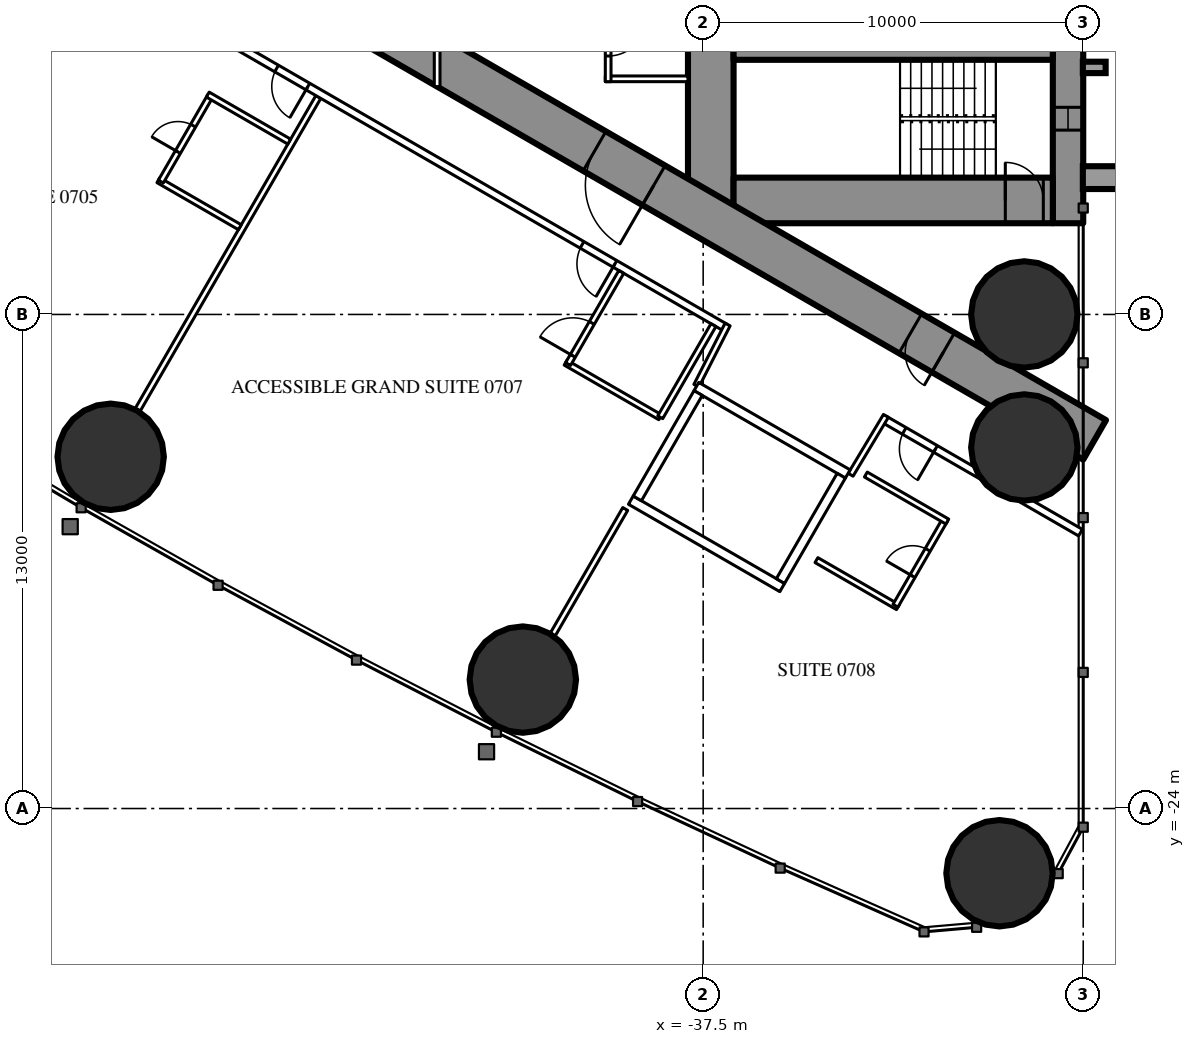
"""IFC4 building model, lengths in metres.
Left out: names, types, materials, properties, quantities, classifications, styles, units other than length and angle.
Written with IfcOpenShell. Run it as: python <this file> out.ifc"""

import sys

from ifc_helpers import new_model, si_unit, direction, frame, frame_2d, origin, origin_2d, place, context, subcontext, project, spatial, rectangle, hollow_circle, extrude, element, fill, save


model = new_model("IFC4")
c1 = context("Model", 3, precision=1e-05, world=origin(), true_north=direction((0.0, 1.0)))
c2 = subcontext(c1, "Body", "Model", "MODEL_VIEW")
j1 = project(units=[si_unit("LENGTHUNIT", "METRE"), si_unit("PLANEANGLEUNIT", "RADIAN")], contexts=[c1])
p1 = place(None, origin())
s1 = spatial("IfcSite", under=j1, at=p1, CompositionType="ELEMENT")
p2 = place(p1, origin())
s2 = spatial("IfcBuilding", under=s1, at=p2, CompositionType="ELEMENT")
p3 = place(p2, frame((0.0, 0.0, 32.0)))
s3 = spatial("IfcBuildingStorey", under=s2, at=p3, CompositionType="ELEMENT", Elevation=32.0)
for number, where, z_axis, x_axis in (
    (1, (-29.703, -25.703, 0.0), (0.0, 0.0, 1.0), (1.0, 0.0, 0.0)),
    (2, (-29.05, -11.0, 0.0), (0.0, 0.0, 1.0), (1.0, 0.0, 0.0)),
    (3, (-29.05, -14.5, 0.0), (0.0, 0.0, 1.0), (1.0, 0.0, 0.0)),
    (4, (-53.09, -14.745, 0.0), (0.0, 0.0, 1.0), (1.0, 0.0, 0.0)),
    (5, (-42.245, -20.607, 0.0), (0.0, 0.0, 1.0), (1.0, 0.0, 0.0)),
):
    element("IfcColumn", number, at=place(p3, frame(where, z_axis=z_axis, x_axis=x_axis)), inside=s3, PredefinedType="COLUMN", context=c2, shape_type="SweptSolid", body=[
        extrude(hollow_circle(Radius=1.4, WallThickness=0.12, at=origin_2d()), origin(), (0.0, 0.0, 1.0), 3.5),
    ])
p4 = place(p3, frame((-27.9, 8.6, 0.0), z_axis=(0.0, 0.0, 1.0), x_axis=(0.0, -1.0, 0.0)))
e6 = element("IfcWall", 6, at=p4, inside=s3, PredefinedType="SHEAR", context=c2, shape_type="SweptSolid", body=[
    extrude(rectangle(XDim=17.2, YDim=0.8, at=frame_2d((8.6, 0.0))), origin(), (0.0, 0.0, 1.0), 3.5),
])
p5 = place(p4, frame((2.45, 0.0, 0.6)))
e7 = element("IfcOpeningElement", 7, at=p5, cuts=e6, PredefinedType="OPENING", context=c2, shape_type="SweptSolid", body=[
    extrude(rectangle(XDim=0.6, YDim=2.1, at=frame_2d((0.3, 1.05))), frame((0.0, 0.41, 0.0), z_axis=(0.0, -1.0, 0.0), x_axis=(1.0, 0.0, 0.0)), (0.0, 0.0, 1.0), 0.82),
])
p6 = place(p4, frame((14.15, 0.0, 0.6)))
e8 = element("IfcOpeningElement", 8, at=p6, cuts=e6, PredefinedType="OPENING", context=c2, shape_type="SweptSolid", body=[
    extrude(rectangle(XDim=0.6, YDim=2.1, at=frame_2d((0.3, 1.05))), frame((0.0, 0.41, 0.0), z_axis=(0.0, -1.0, 0.0), x_axis=(1.0, 0.0, 0.0)), (0.0, 0.0, 1.0), 0.82),
])
p7 = place(p3, frame((-37.3, 8.6, 0.0), z_axis=(0.0, 0.0, 1.0), x_axis=(0.0, -1.0, 0.0)))
e9 = element("IfcWall", 9, at=p7, inside=s3, PredefinedType="SHEAR", context=c2, shape_type="SweptSolid", body=[
    extrude(rectangle(XDim=17.2, YDim=1.2, at=frame_2d((8.6, 0.0))), origin(), (0.0, 0.0, 1.0), 3.5),
])
p8 = place(p7, frame((7.7, 0.0, 0.0)))
e10 = element("IfcOpeningElement", 10, at=p8, cuts=e9, PredefinedType="OPENING", context=c2, shape_type="SweptSolid", body=[
    extrude(rectangle(XDim=1.8, YDim=2.2, at=frame_2d((0.9, 1.1))), frame((0.0, 0.61, 0.0), z_axis=(0.0, -1.0, 0.0), x_axis=(1.0, 0.0, 0.0)), (0.0, 0.0, 1.0), 1.22),
])
p9 = place(p3, frame((-28.3, -8.0, 0.0), z_axis=(0.0, 0.0, 1.0), x_axis=(-1.0, 0.0, 0.0)))
e11 = element("IfcWall", 11, at=p9, inside=s3, PredefinedType="SHEAR", context=c2, shape_type="SweptSolid", body=[
    extrude(rectangle(XDim=8.4, YDim=1.2, at=frame_2d((4.2, 0.0))), origin(), (0.0, 0.0, 1.0), 3.5),
])
p10 = place(p9, frame((0.25, 0.0, 0.0)))
e12 = element("IfcOpeningElement", 12, at=p10, cuts=e11, PredefinedType="OPENING", context=c2, shape_type="SweptSolid", body=[
    extrude(rectangle(XDim=1.0, YDim=2.2, at=frame_2d((0.5, 1.1))), frame((0.0, 0.61, 0.0), z_axis=(0.0, -1.0, 0.0), x_axis=(1.0, 0.0, 0.0)), (0.0, 0.0, 1.0), 1.22),
])
p11 = place(p3, frame((-28.3, -4.15, 0.0), z_axis=(0.0, 0.0, 1.0), x_axis=(-1.0, 0.0, 0.0)))
e13 = element("IfcWall", 13, at=p11, inside=s3, PredefinedType="SHEAR", context=c2, shape_type="SweptSolid", body=[
    extrude(rectangle(XDim=8.4, YDim=0.3, at=frame_2d((4.2, 0.0))), origin(), (0.0, 0.0, 1.0), 3.5),
])
p12 = place(p3, frame((-27.2, -14.3, 0.0), z_axis=(0.0, 0.0, 1.0), x_axis=(-0.866024021859, 0.500002393557, 0.0)))
e14 = element("IfcWall", 14, at=p12, inside=s3, PredefinedType="SHEAR", context=c2, shape_type="SweptSolid", body=[
    extrude(rectangle(XDim=27.907, YDim=1.2, at=frame_2d((13.954, 0.0))), origin(), (0.0, 0.0, 1.0), 3.5),
])
p13 = place(p12, frame((4.6, 0.0, 0.0)))
e15 = element("IfcOpeningElement", 15, at=p13, cuts=e14, PredefinedType="OPENING", context=c2, shape_type="SweptSolid", body=[
    extrude(rectangle(XDim=1.0, YDim=2.2, at=frame_2d((0.5, 1.1))), frame((0.0, 0.61, 0.0), z_axis=(0.0, -1.0, 0.0), x_axis=(1.0, 0.0, 0.0)), (0.0, 0.0, 1.0), 1.22),
])
p14 = place(p12, frame((13.395, 0.0, 0.0)))
e16 = element("IfcOpeningElement", 16, at=p14, cuts=e14, PredefinedType="OPENING", context=c2, shape_type="SweptSolid", body=[
    extrude(rectangle(XDim=1.8, YDim=2.2, at=frame_2d((0.9, 1.1))), frame((0.0, 0.61, 0.0), z_axis=(0.0, -1.0, 0.0), x_axis=(1.0, 0.0, 0.0)), (0.0, 0.0, 1.0), 1.22),
])
p15 = place(p3, frame((-47.627, -5.278, 0.0), z_axis=(0.0, 0.0, 1.0), x_axis=(-0.500009844318, -0.86601972009, 0.0)))
e17 = element("IfcWall", 17, at=p15, inside=s3, PredefinedType="PARTITIONING", context=c2, shape_type="SweptSolid", body=[
    extrude(rectangle(XDim=9.51, YDim=0.15, at=frame_2d((4.755, 0.0))), origin(), (0.0, 0.0, 1.0), 2.25),
])
p16 = place(p3, frame((-39.551, -16.118, 0.0), z_axis=(0.0, 0.0, 1.0), x_axis=(-0.499986503906, -0.866033195618, 0.0)))
e18 = element("IfcWall", 18, at=p16, inside=s3, PredefinedType="PARTITIONING", context=c2, shape_type="SweptSolid", body=[
    extrude(rectangle(XDim=3.815, YDim=0.15, at=frame_2d((1.907, 0.0))), origin(), (0.0, 0.0, 1.0), 3.25),
])
p17 = place(p3, frame((-27.572, -16.741, 0.0), z_axis=(0.0, 0.0, 1.0), x_axis=(-0.866024464444, 0.500001626982, 0.0)))
e19 = element("IfcWall", 19, at=p17, inside=s3, PredefinedType="PARTITIONING", context=c2, shape_type="SweptSolid", body=[
    extrude(rectangle(XDim=5.955, YDim=0.2, at=frame_2d((2.978, 0.0))), origin(), (0.0, 0.0, 1.0), 3.25),
])
p18 = place(p17, frame((4.405, 0.0, 0.0)))
e20 = element("IfcOpeningElement", 20, at=p18, cuts=e19, PredefinedType="OPENING", context=c2, shape_type="SweptSolid", body=[
    extrude(rectangle(XDim=0.95, YDim=2.2, at=frame_2d((0.475, 1.1))), frame((0.0, 0.11, 0.0), z_axis=(0.0, -1.0, 0.0), x_axis=(1.0, 0.0, 0.0)), (0.0, 0.0, 1.0), 0.22),
])
p19 = place(p3, frame((-36.92, -11.344, 0.0), z_axis=(0.0, 0.0, 1.0), x_axis=(-0.866028313256, 0.499994960614, 0.0)))
e21 = element("IfcWall", 21, at=p19, inside=s3, PredefinedType="PARTITIONING", context=c2, shape_type="SweptSolid", body=[
    extrude(rectangle(XDim=22.568, YDim=0.2, at=frame_2d((11.284, 0.0))), origin(), (0.0, 0.0, 1.0), 3.25),
])
p20 = place(p19, frame((12.68, 0.0, 0.0)))
e22 = element("IfcOpeningElement", 22, at=p20, cuts=e21, PredefinedType="OPENING", context=c2, shape_type="SweptSolid", body=[
    extrude(rectangle(XDim=0.95, YDim=2.2, at=frame_2d((0.475, 1.1))), frame((0.0, 0.11, 0.0), z_axis=(0.0, -1.0, 0.0), x_axis=(1.0, 0.0, 0.0)), (0.0, 0.0, 1.0), 0.22),
])
p21 = place(p19, frame((3.35, 0.0, 0.0)))
e23 = element("IfcOpeningElement", 23, at=p21, cuts=e21, PredefinedType="OPENING", context=c2, shape_type="SweptSolid", body=[
    extrude(rectangle(XDim=1.0, YDim=2.2, at=frame_2d((0.5, 1.1))), frame((0.0, 0.11, 0.0), z_axis=(0.0, -1.0, 0.0), x_axis=(1.0, 0.0, 0.0)), (0.0, 0.0, 1.0), 0.22),
])
p22 = place(p3, frame((-36.857, -11.265, 0.0), z_axis=(0.0, 0.0, 1.0), x_axis=(-0.454225294761, -0.890886851176, 0.0)))
e24 = element("IfcWall", 24, at=p22, inside=s3, PredefinedType="PARTITIONING", context=c2, shape_type="SweptSolid", body=[
    extrude(rectangle(XDim=1.807, YDim=0.15, at=frame_2d((0.904, 0.0))), origin(), (0.0, 0.0, 1.0), 3.25),
])
p23 = place(p3, frame((-33.621, -15.218, 0.0), z_axis=(0.0, 0.0, 1.0), x_axis=(0.514336634837, 0.857588377991, 0.0)))
e25 = element("IfcWall", 25, at=p23, inside=s3, PredefinedType="PARTITIONING", context=c2, shape_type="SweptSolid", body=[
    extrude(rectangle(XDim=1.805, YDim=0.15, at=frame_2d((0.903, 0.0))), origin(), (0.0, 0.0, 1.0), 3.25),
])
p24 = place(p3, frame((-49.692, -8.704, 0.0), z_axis=(0.0, 0.0, 1.0), x_axis=(-0.866073894602, 0.499916002032, 0.0)))
e26 = element("IfcWall", 26, at=p24, inside=s3, PredefinedType="PARTITIONING", context=c2, shape_type="SweptSolid", body=[
    extrude(rectangle(XDim=2.475, YDim=0.15, at=frame_2d((1.238, 0.0))), origin(), (0.0, 0.0, 1.0), 3.25),
])
p25 = place(p3, frame((-50.47, -5.253, 0.0), z_axis=(0.0, 0.0, 1.0), x_axis=(-0.500006934395, -0.866021400173, 0.0)))
e27 = element("IfcWall", 27, at=p25, inside=s3, PredefinedType="PARTITIONING", context=c2, shape_type="SweptSolid", body=[
    extrude(rectangle(XDim=2.6, YDim=0.15, at=frame_2d((1.3, 0.0))), origin(), (0.0, 0.0, 1.0), 3.25),
])
p26 = place(p25, frame((0.9, 0.0, 0.0)))
e28 = element("IfcOpeningElement", 28, at=p26, cuts=e27, PredefinedType="OPENING", context=c2, shape_type="SweptSolid", body=[
    extrude(rectangle(XDim=0.8, YDim=2.2, at=frame_2d((0.4, 1.1))), frame((0.0, 0.085, 0.0), z_axis=(0.0, -1.0, 0.0), x_axis=(1.0, 0.0, 0.0)), (0.0, 0.0, 1.0), 0.17),
])
p27 = place(p3, frame((-48.392, -6.453, 0.0), z_axis=(0.0, 0.0, 1.0), x_axis=(-0.86604923931, 0.499958713387, 0.0)))
e29 = element("IfcWall", 29, at=p27, inside=s3, PredefinedType="PARTITIONING", context=c2, shape_type="SweptSolid", body=[
    extrude(rectangle(XDim=2.475, YDim=0.15, at=frame_2d((1.237, 0.0))), origin(), (0.0, 0.0, 1.0), 3.25),
])
p28 = place(p3, frame((-38.63, -13.705, 0.0), z_axis=(0.0, 0.0, 1.0), x_axis=(-0.866018712932, 0.500011588718, 0.0)))
e30 = element("IfcWall", 30, at=p28, inside=s3, PredefinedType="PARTITIONING", context=c2, shape_type="SweptSolid", body=[
    extrude(rectangle(XDim=2.875, YDim=0.15, at=frame_2d((1.438, 0.0))), origin(), (0.0, 0.0, 1.0), 3.25),
])
p29 = place(p3, frame((-39.655, -9.88, 0.0), z_axis=(0.0, 0.0, 1.0), x_axis=(-0.500049511043, -0.865996816683, 0.0)))
e31 = element("IfcWall", 31, at=p29, inside=s3, PredefinedType="PARTITIONING", context=c2, shape_type="SweptSolid", body=[
    extrude(rectangle(XDim=2.8, YDim=0.15, at=frame_2d((1.4, 0.0))), origin(), (0.0, 0.0, 1.0), 3.25),
])
p30 = place(p29, frame((1.55, 0.0, 0.0)))
e32 = element("IfcOpeningElement", 32, at=p30, cuts=e31, PredefinedType="OPENING", context=c2, shape_type="SweptSolid", body=[
    extrude(rectangle(XDim=1.0, YDim=2.2, at=frame_2d((0.5, 1.1))), frame((0.0, 0.085, 0.0), z_axis=(0.0, -1.0, 0.0), x_axis=(1.0, 0.0, 0.0)), (0.0, 0.0, 1.0), 0.17),
])
p31 = place(p3, frame((-37.23, -11.281, 0.0), z_axis=(0.0, 0.0, 1.0), x_axis=(-0.500049511043, -0.865996816683, 0.0)))
e33 = element("IfcWall", 33, at=p31, inside=s3, PredefinedType="PARTITIONING", context=c2, shape_type="SweptSolid", body=[
    extrude(rectangle(XDim=2.8, YDim=0.15, at=frame_2d((1.4, 0.0))), origin(), (0.0, 0.0, 1.0), 3.25),
])
p32 = place(p3, frame((-32.376, -18.702, 0.0), z_axis=(0.0, 0.0, 1.0), x_axis=(-0.866006523861, 0.500032699561, 0.0)))
e34 = element("IfcWall", 34, at=p32, inside=s3, PredefinedType="PARTITIONING", context=c2, shape_type="SweptSolid", body=[
    extrude(rectangle(XDim=2.475, YDim=0.15, at=frame_2d((1.237, 0.0))), origin(), (0.0, 0.0, 1.0), 3.25),
])
p33 = place(p3, frame((-31.141, -16.413, 0.0), z_axis=(0.0, 0.0, 1.0), x_axis=(-0.500006934395, -0.866021400173, 0.0)))
e35 = element("IfcWall", 35, at=p33, inside=s3, PredefinedType="PARTITIONING", context=c2, shape_type="SweptSolid", body=[
    extrude(rectangle(XDim=2.6, YDim=0.15, at=frame_2d((1.3, 0.0))), origin(), (0.0, 0.0, 1.0), 3.25),
])
p34 = place(p33, frame((0.9, 0.0, 0.0)))
e36 = element("IfcOpeningElement", 36, at=p34, cuts=e35, PredefinedType="OPENING", context=c2, shape_type="SweptSolid", body=[
    extrude(rectangle(XDim=0.8, YDim=2.2, at=frame_2d((0.4, 1.1))), frame((0.0, 0.085, 0.0), z_axis=(0.0, -1.0, 0.0), x_axis=(1.0, 0.0, 0.0)), (0.0, 0.0, 1.0), 0.17),
])
p35 = place(p3, frame((-31.076, -16.45, 0.0), z_axis=(0.0, 0.0, 1.0), x_axis=(-0.866073894602, 0.499916002032, 0.0)))
e37 = element("IfcWall", 37, at=p35, inside=s3, PredefinedType="PARTITIONING", context=c2, shape_type="SweptSolid", body=[
    extrude(rectangle(XDim=2.475, YDim=0.15, at=frame_2d((1.238, 0.0))), origin(), (0.0, 0.0, 1.0), 3.25),
])
p36 = place(p3, frame((-37.9, -4.8, 0.0), z_axis=(0.0, 0.0, 1.0), x_axis=(-1.0, 0.0, 0.0)))
e38 = element("IfcWall", 38, at=p36, inside=s3, PredefinedType="PARTITIONING", context=c2, shape_type="SweptSolid", body=[
    extrude(rectangle(XDim=2.175, YDim=0.15, at=frame_2d((1.087, 0.0))), origin(), (0.0, 0.0, 1.0), 3.25),
])
p37 = place(p3, frame((-40.0, -2.525, 0.0), z_axis=(0.0, 0.0, 1.0), x_axis=(0.0, -1.0, 0.0)))
e39 = element("IfcWall", 39, at=p37, inside=s3, PredefinedType="PARTITIONING", context=c2, shape_type="SweptSolid", body=[
    extrude(rectangle(XDim=2.35, YDim=0.15, at=frame_2d((1.175, 0.0))), origin(), (0.0, 0.0, 1.0), 3.25),
])
p38 = place(p37, frame((0.675, 0.0, 0.0)))
e40 = element("IfcOpeningElement", 40, at=p38, cuts=e39, PredefinedType="OPENING", context=c2, shape_type="SweptSolid", body=[
    extrude(rectangle(XDim=1.0, YDim=2.2, at=frame_2d((0.5, 1.1))), frame((0.0, 0.085, 0.0), z_axis=(0.0, -1.0, 0.0), x_axis=(1.0, 0.0, 0.0)), (0.0, 0.0, 1.0), 0.17),
])
p39 = place(p3, frame((-44.5, 5.005, 0.0), z_axis=(0.0, 0.0, 1.0), x_axis=(0.0, -1.0, 0.0)))
e41 = element("IfcWall", 41, at=p39, inside=s3, PredefinedType="PARTITIONING", context=c2, shape_type="SweptSolid", body=[
    extrude(rectangle(XDim=10.009, YDim=0.15, at=frame_2d((5.005, 0.0))), origin(), (0.0, 0.0, 1.0), 2.45),
])
p40 = place(p39, frame((2.002, 0.0, 0.0)))
e42 = element("IfcOpeningElement", 42, at=p40, cuts=e41, PredefinedType="OPENING", context=c2, shape_type="SweptSolid", body=[
    extrude(rectangle(XDim=1.0, YDim=2.2, at=frame_2d((0.5, 1.1))), frame((0.0, 0.085, 0.0), z_axis=(0.0, -1.0, 0.0), x_axis=(1.0, 0.0, 0.0)), (0.0, 0.0, 1.0), 0.17),
])
p41 = place(p39, frame((7.007, 0.0, 0.0)))
e43 = element("IfcOpeningElement", 43, at=p41, cuts=e41, PredefinedType="OPENING", context=c2, shape_type="SweptSolid", body=[
    extrude(rectangle(XDim=1.0, YDim=2.2, at=frame_2d((0.5, 1.1))), frame((0.0, 0.085, 0.0), z_axis=(0.0, -1.0, 0.0), x_axis=(1.0, 0.0, 0.0)), (0.0, 0.0, 1.0), 0.17),
])
p42 = place(p3, frame((-33.696, -15.197, 0.0), z_axis=(0.0, 0.0, 1.0), x_axis=(-0.865976953817, 0.500083908417, 0.0)))
e44 = element("IfcWall", 44, at=p42, inside=s3, PredefinedType="PARTITIONING", context=c2, shape_type="SweptSolid", body=[
    extrude(rectangle(XDim=4.599, YDim=0.25, at=frame_2d((2.3, 0.0))), origin(), (0.0, 0.0, 1.0), 3.25),
])
p43 = place(p3, frame((-35.42, -18.186, 0.0), z_axis=(0.0, 0.0, 1.0), x_axis=(-0.865990227814, 0.50006092162, 0.0)))
e45 = element("IfcWall", 45, at=p43, inside=s3, PredefinedType="PARTITIONING", context=c2, shape_type="SweptSolid", body=[
    extrude(rectangle(XDim=4.6, YDim=0.25, at=frame_2d((2.3, 0.0))), origin(), (0.0, 0.0, 1.0), 3.25),
])
p44 = place(p3, frame((-33.866, -15.243, 0.0), z_axis=(0.0, 0.0, 1.0), x_axis=(-0.499929347863, -0.866066190972, 0.0)))
e46 = element("IfcWall", 46, at=p44, inside=s3, PredefinedType="PARTITIONING", context=c2, shape_type="SweptSolid", body=[
    extrude(rectangle(XDim=3.201, YDim=0.25, at=frame_2d((1.6, 0.0))), origin(), (0.0, 0.0, 1.0), 3.25),
])
p45 = place(p3, frame((-37.633, -13.068, 0.0), z_axis=(0.0, 0.0, 1.0), x_axis=(-0.499872130319, -0.866099216793, 0.0)))
e47 = element("IfcWall", 47, at=p45, inside=s3, PredefinedType="PARTITIONING", context=c2, shape_type="SweptSolid", body=[
    extrude(rectangle(XDim=3.2, YDim=0.25, at=frame_2d((1.6, 0.0))), origin(), (0.0, 0.0, 1.0), 3.25),
])
p46 = place(p26, origin())
e48 = element("IfcDoor", 48, at=p46, inside=s3, OperationType="SINGLE_SWING_RIGHT", PredefinedType="DOOR", context=c2, shape_type="SweptSolid", body=[
    extrude(rectangle(XDim=0.8, YDim=2.2, at=frame_2d((0.4, 1.1))), frame((0.0, 0.025, 0.0), z_axis=(0.0, -1.0, 0.0), x_axis=(1.0, 0.0, 0.0)), (0.0, 0.0, 1.0), 0.05),
])
fill(e28, e48)
p47 = place(p20, origin())
e49 = element("IfcDoor", 49, at=p47, inside=s3, OperationType="SINGLE_SWING_LEFT", PredefinedType="DOOR", context=c2, shape_type="SweptSolid", body=[
    extrude(rectangle(XDim=0.95, YDim=2.2, at=frame_2d((0.475, 1.1))), frame((0.0, 0.025, 0.0), z_axis=(0.0, -1.0, 0.0), x_axis=(1.0, 0.0, 0.0)), (0.0, 0.0, 1.0), 0.05),
])
fill(e22, e49)
p48 = place(p30, origin())
e50 = element("IfcDoor", 50, at=p48, inside=s3, OperationType="SINGLE_SWING_RIGHT", PredefinedType="DOOR", context=c2, shape_type="SweptSolid", body=[
    extrude(rectangle(XDim=1.0, YDim=2.2, at=frame_2d((0.5, 1.1))), frame((0.0, 0.025, 0.0), z_axis=(0.0, -1.0, 0.0), x_axis=(1.0, 0.0, 0.0)), (0.0, 0.0, 1.0), 0.05),
])
fill(e32, e50)
p49 = place(p21, origin())
e51 = element("IfcDoor", 51, at=p49, inside=s3, OperationType="SINGLE_SWING_LEFT", PredefinedType="DOOR", context=c2, shape_type="SweptSolid", body=[
    extrude(rectangle(XDim=1.0, YDim=2.2, at=frame_2d((0.5, 1.1))), frame((0.0, 0.025, 0.0), z_axis=(0.0, -1.0, 0.0), x_axis=(1.0, 0.0, 0.0)), (0.0, 0.0, 1.0), 0.05),
])
fill(e23, e51)
p50 = place(p34, origin())
e52 = element("IfcDoor", 52, at=p50, inside=s3, OperationType="SINGLE_SWING_RIGHT", PredefinedType="DOOR", context=c2, shape_type="SweptSolid", body=[
    extrude(rectangle(XDim=0.8, YDim=2.2, at=frame_2d((0.4, 1.1))), frame((0.0, 0.025, 0.0), z_axis=(0.0, -1.0, 0.0), x_axis=(1.0, 0.0, 0.0)), (0.0, 0.0, 1.0), 0.05),
])
fill(e36, e52)
p51 = place(p18, origin())
e53 = element("IfcDoor", 53, at=p51, inside=s3, OperationType="SINGLE_SWING_LEFT", PredefinedType="DOOR", context=c2, shape_type="SweptSolid", body=[
    extrude(rectangle(XDim=0.95, YDim=2.2, at=frame_2d((0.475, 1.1))), frame((0.0, 0.025, 0.0), z_axis=(0.0, -1.0, 0.0), x_axis=(1.0, 0.0, 0.0)), (0.0, 0.0, 1.0), 0.05),
])
fill(e20, e53)
p52 = place(p38, origin())
e54 = element("IfcDoor", 54, at=p52, inside=s3, OperationType="SINGLE_SWING_LEFT", PredefinedType="DOOR", context=c2, shape_type="SweptSolid", body=[
    extrude(rectangle(XDim=1.0, YDim=2.2, at=frame_2d((0.5, 1.1))), frame((0.0, 0.025, 0.0), z_axis=(0.0, -1.0, 0.0), x_axis=(1.0, 0.0, 0.0)), (0.0, 0.0, 1.0), 0.05),
])
fill(e40, e54)
p53 = place(p13, origin())
e55 = element("IfcDoor", 55, at=p53, inside=s3, OperationType="SINGLE_SWING_LEFT", PredefinedType="DOOR", context=c2, shape_type="SweptSolid", body=[
    extrude(rectangle(XDim=1.0, YDim=2.2, at=frame_2d((0.5, 1.1))), frame((0.0, 0.025, 0.0), z_axis=(0.0, -1.0, 0.0), x_axis=(1.0, 0.0, 0.0)), (0.0, 0.0, 1.0), 0.05),
])
fill(e15, e55)
p54 = place(p14, origin())
e56 = element("IfcDoor", 56, at=p54, inside=s3, OperationType="DOUBLE_DOOR_SINGLE_SWING", PredefinedType="DOOR", context=c2, shape_type="SweptSolid", body=[
    extrude(rectangle(XDim=1.8, YDim=2.2, at=frame_2d((0.9, 1.1))), frame((0.0, 0.025, 0.0), z_axis=(0.0, -1.0, 0.0), x_axis=(1.0, 0.0, 0.0)), (0.0, 0.0, 1.0), 0.05),
])
fill(e16, e56)
p55 = place(p10, origin())
e57 = element("IfcDoor", 57, at=p55, inside=s3, OperationType="SINGLE_SWING_RIGHT", PredefinedType="DOOR", context=c2, shape_type="SweptSolid", body=[
    extrude(rectangle(XDim=1.0, YDim=2.2, at=frame_2d((0.5, 1.1))), frame((0.0, 0.025, 0.0), z_axis=(0.0, -1.0, 0.0), x_axis=(1.0, 0.0, 0.0)), (0.0, 0.0, 1.0), 0.05),
])
fill(e12, e57)
p56 = place(p6, origin())
e58 = element("IfcWindow", 58, at=p56, inside=s3, PartitioningType="SINGLE_PANEL", PredefinedType="WINDOW", context=c2, shape_type="SweptSolid", body=[
    extrude(rectangle(XDim=0.6, YDim=2.1, at=frame_2d((0.3, 1.05))), frame((0.0, 0.03, 0.0), z_axis=(0.0, -1.0, 0.0), x_axis=(1.0, 0.0, 0.0)), (0.0, 0.0, 1.0), 0.06),
])
fill(e8, e58)
save(model, sys.argv[1])
